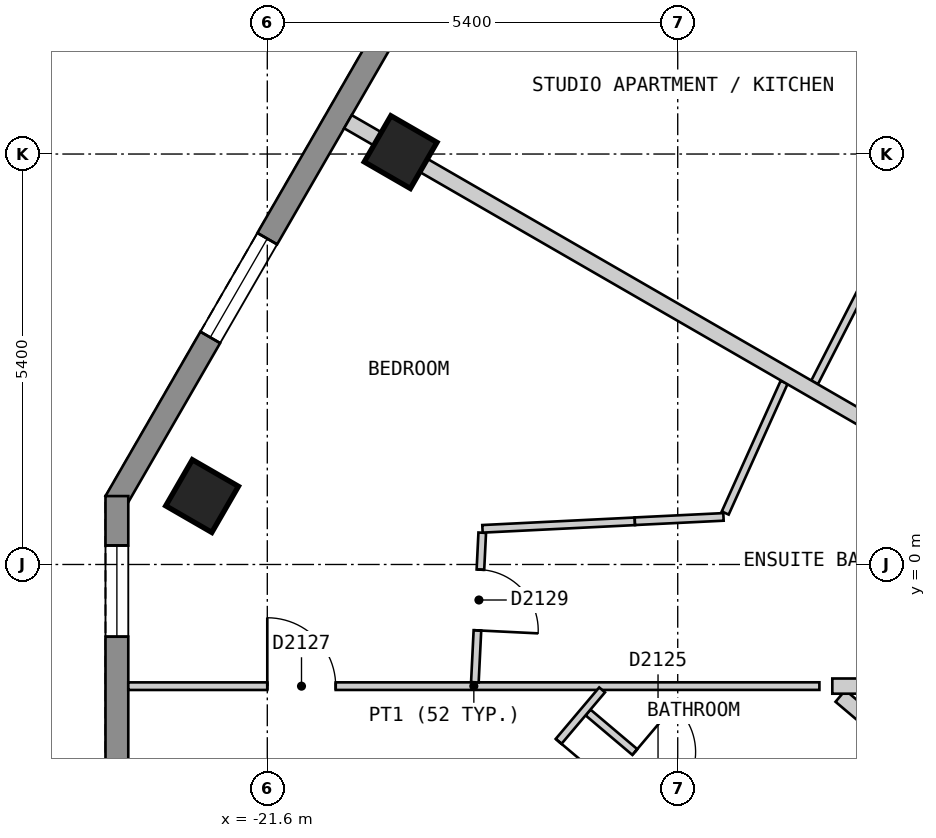
"""IFC4 building model, lengths in metres.
Left out: names, types, materials, properties, quantities, classifications, styles, units other than length and angle.
Written with IfcOpenShell. Run it as: python <this file> out.ifc"""

import sys

from ifc_helpers import new_model, si_unit, direction, frame, frame_2d, origin, origin_2d, place, context, subcontext, project, spatial, polyline, rectangle, outline, extrude, element, fill, save


model = new_model("IFC4")
c1 = context("Model", 3, precision=1e-05, world=origin(), true_north=direction((0.0, 1.0)))
c2 = subcontext(c1, "Body", "Model", "MODEL_VIEW")
j1 = project(units=[si_unit("LENGTHUNIT", "METRE"), si_unit("PLANEANGLEUNIT", "RADIAN")], contexts=[c1])
p1 = place(None, origin())
s1 = spatial("IfcSite", under=j1, at=p1, CompositionType="ELEMENT")
p2 = place(p1, origin())
s2 = spatial("IfcBuilding", under=s1, at=p2, CompositionType="ELEMENT")
p3 = place(p2, frame((0.0, 0.0, 217.8)))
s3 = spatial("IfcBuildingStorey", under=s2, at=p3, CompositionType="ELEMENT", Elevation=217.8)
for number, where, z_axis, x_axis in (
    (1, (-19.846, 5.425, 0.0), (0.0, 0.0, 1.0), (-0.5, -0.866, 0.0)),
    (2, (-22.458, 0.9, 0.0), (0.0, 0.0, 1.0), (-0.5, -0.866, 0.0)),
):
    element("IfcColumn", number, at=place(p3, frame(where, z_axis=z_axis, x_axis=x_axis)), inside=s3, PredefinedType="COLUMN", context=c2, shape_type="SweptSolid", body=[
        extrude(rectangle(XDim=0.7, YDim=0.7, at=origin_2d()), origin(), (0.0, 0.0, 1.0), 3.0),
    ])
p4 = place(p3, frame((-12.514, 20.025, 0.0), z_axis=(0.0, 0.0, 1.0), x_axis=(-0.500003656944, -0.866023292436, 0.0)))
e3 = element("IfcWall", 3, at=p4, inside=s3, PredefinedType="SOLIDWALL", context=c2, shape_type="SweptSolid", body=[
    extrude(outline(polyline([(0.0, -0.15), (22.17, -0.15), (22.09, 0.15), (0.08, 0.15), (0.0, -0.15)])), origin(), (0.0, 0.0, 1.0), 2.7),
])
p5 = place(p4, frame((2.497, 0.0, 0.15)))
e4 = element("IfcOpeningElement", 4, at=p5, cuts=e3, PredefinedType="OPENING", context=c2, shape_type="SweptSolid", body=[
    extrude(rectangle(XDim=1.5, YDim=2.1, at=frame_2d((0.75, 1.05))), frame((0.0, 0.16, 0.0), z_axis=(0.0, -1.0, 0.0), x_axis=(1.0, 0.0, 0.0)), (0.0, 0.0, 1.0), 0.32),
])
p6 = place(p4, frame((7.722, 0.0, 0.15)))
e5 = element("IfcOpeningElement", 5, at=p6, cuts=e3, PredefinedType="OPENING", context=c2, shape_type="SweptSolid", body=[
    extrude(rectangle(XDim=1.5, YDim=2.1, at=frame_2d((0.75, 1.05))), frame((0.0, 0.16, 0.0), z_axis=(0.0, -1.0, 0.0), x_axis=(1.0, 0.0, 0.0)), (0.0, 0.0, 1.0), 0.32),
])
p7 = place(p4, frame((12.948, 0.0, 0.15)))
e6 = element("IfcOpeningElement", 6, at=p7, cuts=e3, PredefinedType="OPENING", context=c2, shape_type="SweptSolid", body=[
    extrude(rectangle(XDim=1.5, YDim=2.1, at=frame_2d((0.75, 1.05))), frame((0.0, 0.16, 0.0), z_axis=(0.0, -1.0, 0.0), x_axis=(1.0, 0.0, 0.0)), (0.0, 0.0, 1.0), 0.32),
])
p8 = place(p4, frame((18.173, 0.0, 0.15)))
e7 = element("IfcOpeningElement", 7, at=p8, cuts=e3, PredefinedType="OPENING", context=c2, shape_type="SweptSolid", body=[
    extrude(rectangle(XDim=1.5, YDim=2.1, at=frame_2d((0.75, 1.05))), frame((0.0, 0.16, 0.0), z_axis=(0.0, -1.0, 0.0), x_axis=(1.0, 0.0, 0.0)), (0.0, 0.0, 1.0), 0.32),
])
p9 = place(p3, frame((-23.579, 0.9, 0.0), z_axis=(0.0, 0.0, 1.0), x_axis=(0.0, -1.0, 0.0)))
e8 = element("IfcWall", 8, at=p9, inside=s3, PredefinedType="SOLIDWALL", context=c2, shape_type="SweptSolid", body=[
    extrude(outline(polyline([(0.0, -0.15), (5.0, -0.15), (4.92, 0.15), (0.08, 0.15), (0.0, -0.15)])), origin(), (0.0, 0.0, 1.0), 2.7),
])
p10 = place(p9, frame((0.65, 0.0, 0.15)))
e9 = element("IfcOpeningElement", 9, at=p10, cuts=e8, PredefinedType="OPENING", context=c2, shape_type="SweptSolid", body=[
    extrude(rectangle(XDim=1.2, YDim=2.1, at=frame_2d((0.6, 1.05))), frame((0.0, 0.16, 0.0), z_axis=(0.0, -1.0, 0.0), x_axis=(1.0, 0.0, 0.0)), (0.0, 0.0, 1.0), 0.32),
])
p11 = place(p3, frame((-17.38, -1.947, 0.0), z_axis=(0.0, 0.0, 1.0), x_axis=(0.763616683524, -0.645669854217, 0.0)))
e10 = element("IfcWall", 10, at=p11, inside=s3, PredefinedType="PARTITIONING", context=c2, shape_type="SweptSolid", body=[
    extrude(rectangle(XDim=2.331, YDim=0.1, at=frame_2d((1.166, 0.0))), origin(), (0.0, 0.0, 1.0), 2.7),
])
p12 = place(p11, frame((0.806, 0.0, 0.0)))
e11 = element("IfcOpeningElement", 11, at=p12, cuts=e10, PredefinedType="OPENING", context=c2, shape_type="SweptSolid", body=[
    extrude(rectangle(XDim=0.8, YDim=2.1, at=frame_2d((0.4, 1.05))), frame((0.0, 0.06, 0.0), z_axis=(0.0, -1.0, 0.0), x_axis=(1.0, 0.0, 0.0)), (0.0, 0.0, 1.0), 0.12),
])
p13 = place(p3, frame((-23.429, -1.601, 0.0), z_axis=(0.0, 0.0, 1.0), x_axis=(0.999999994233, 0.000107396965, 0.0)))
e12 = element("IfcWall", 12, at=p13, inside=s3, PredefinedType="PARTITIONING", context=c2, shape_type="SweptSolid", body=[
    extrude(rectangle(XDim=9.093, YDim=0.1, at=frame_2d((4.546, 0.0))), origin(), (0.0, 0.0, 1.0), 2.7),
])
p14 = place(p13, frame((1.829, 0.0, 0.0)))
e13 = element("IfcOpeningElement", 13, at=p14, cuts=e12, PredefinedType="OPENING", context=c2, shape_type="SweptSolid", body=[
    extrude(rectangle(XDim=0.9, YDim=2.1, at=frame_2d((0.45, 1.05))), frame((0.0, 0.06, 0.0), z_axis=(0.0, -1.0, 0.0), x_axis=(1.0, 0.0, 0.0)), (0.0, 0.0, 1.0), 0.12),
])
p15 = place(p3, frame((-20.188, -5.191, 0.0), z_axis=(0.0, 0.0, 1.0), x_axis=(0.645524337256, 0.763739700429, 0.0)))
e14 = element("IfcWall", 14, at=p15, inside=s3, PredefinedType="PARTITIONING", context=c2, shape_type="SweptSolid", body=[
    extrude(rectangle(XDim=4.636, YDim=0.1, at=frame_2d((2.318, 0.0))), origin(), (0.0, 0.0, 1.0), 2.7),
])
p16 = place(p15, frame((2.85, 0.0, 0.0)))
e15 = element("IfcOpeningElement", 15, at=p16, cuts=e14, PredefinedType="OPENING", context=c2, shape_type="SweptSolid", body=[
    extrude(rectangle(XDim=0.9, YDim=2.1, at=frame_2d((0.45, 1.05))), frame((0.0, 0.06, 0.0), z_axis=(0.0, -1.0, 0.0), x_axis=(1.0, 0.0, 0.0)), (0.0, 0.0, 1.0), 0.12),
])
p17 = place(p3, frame((-15.575, 0.677, 0.0), z_axis=(0.0, 0.0, 1.0), x_axis=(0.410768223147, 0.911739802165, 0.0)))
e16 = element("IfcWall", 16, at=p17, inside=s3, PredefinedType="PARTITIONING", context=c2, shape_type="SweptSolid", body=[
    extrude(rectangle(XDim=1.886, YDim=0.1, at=frame_2d((0.943, 0.0))), origin(), (0.0, 0.0, 1.0), 2.7),
])
p18 = place(p3, frame((-14.399, 2.396, 0.0), z_axis=(0.0, 0.0, 1.0), x_axis=(0.455967231787, 0.889996563778, 0.0)))
e17 = element("IfcWall", 17, at=p18, inside=s3, PredefinedType="PARTITIONING", context=c2, shape_type="SweptSolid", body=[
    extrude(rectangle(XDim=3.149, YDim=0.1, at=frame_2d((1.575, 0.0))), origin(), (0.0, 0.0, 1.0), 2.7),
])
p19 = place(p3, frame((-18.869, -1.55, 0.0), z_axis=(0.0, 0.0, 1.0), x_axis=(0.049189853645, 0.998789446429, 0.0)))
e18 = element("IfcWall", 18, at=p19, inside=s3, PredefinedType="PARTITIONING", context=c2, shape_type="SweptSolid", body=[
    extrude(rectangle(XDim=1.97, YDim=0.1, at=frame_2d((0.985, 0.0))), origin(), (0.0, 0.0, 1.0), 2.7),
])
p20 = place(p19, frame((0.684, 0.0, 0.0)))
e19 = element("IfcOpeningElement", 19, at=p20, cuts=e18, PredefinedType="OPENING", context=c2, shape_type="SweptSolid", body=[
    extrude(rectangle(XDim=0.8, YDim=2.1, at=frame_2d((0.4, 1.05))), frame((0.0, 0.06, 0.0), z_axis=(0.0, -1.0, 0.0), x_axis=(1.0, 0.0, 0.0)), (0.0, 0.0, 1.0), 0.12),
])
p21 = place(p3, frame((-18.769, 0.469, 0.0), z_axis=(0.0, 0.0, 1.0), x_axis=(0.998780383332, 0.049373534108, 0.0)))
e20 = element("IfcWall", 20, at=p21, inside=s3, PredefinedType="PARTITIONING", context=c2, shape_type="SweptSolid", body=[
    extrude(rectangle(XDim=2.008, YDim=0.1, at=frame_2d((1.004, 0.0))), origin(), (0.0, 0.0, 1.0), 2.7),
])
p22 = place(p3, frame((-16.764, 0.569, 0.0), z_axis=(0.0, 0.0, 1.0), x_axis=(0.998812102885, 0.048727642373, 0.0)))
e21 = element("IfcWall", 21, at=p22, inside=s3, PredefinedType="PARTITIONING", context=c2, shape_type="SweptSolid", body=[
    extrude(rectangle(XDim=1.167, YDim=0.1, at=frame_2d((0.584, 0.0))), origin(), (0.0, 0.0, 1.0), 2.7),
])
p23 = place(p3, frame((-20.539, 5.825, 0.0), z_axis=(0.0, 0.0, 1.0), x_axis=(0.866046068403, -0.499964206122, 0.0)))
e22 = element("IfcWall", 22, at=p23, inside=s3, PredefinedType="PARTITIONING", context=c2, shape_type="SweptSolid", body=[
    extrude(rectangle(XDim=9.995, YDim=0.2, at=frame_2d((4.998, 0.0))), origin(), (0.0, 0.0, 1.0), 2.7),
])
p24 = place(p3, frame((-17.926, 10.35, 0.0), z_axis=(0.0, 0.0, 1.0), x_axis=(0.866018411306, -0.500012111133, 0.0)))
e23 = element("IfcWall", 23, at=p24, inside=s3, PredefinedType="PARTITIONING", context=c2, shape_type="SweptSolid", body=[
    extrude(rectangle(XDim=9.898, YDim=0.2, at=frame_2d((4.949, 0.0))), origin(), (0.0, 0.0, 1.0), 2.7),
])
p25 = place(p3, frame((-14.059, -1.73, 0.0), z_axis=(0.0, 0.0, 1.0), x_axis=(0.763289607824, -0.64605647941, 0.0)))
e24 = element("IfcWall", 24, at=p25, inside=s3, PredefinedType="PARTITIONING", context=c2, shape_type="SweptSolid", body=[
    extrude(rectangle(XDim=0.766, YDim=0.2, at=frame_2d((0.383, 0.0))), origin(), (0.0, 0.0, 1.0), 2.7),
])
p26 = place(p3, frame((-14.166, -1.6, 0.0), z_axis=(0.0, 0.0, 1.0), x_axis=(1.0, 0.0, 0.0)))
e25 = element("IfcWall", 25, at=p26, inside=s3, PredefinedType="PARTITIONING", context=c2, shape_type="SweptSolid", body=[
    extrude(rectangle(XDim=0.973, YDim=0.2, at=frame_2d((0.486, 0.0))), origin(), (0.0, 0.0, 1.0), 2.7),
])
p27 = place(p8, origin())
e26 = element("IfcWindow", 26, at=p27, inside=s3, PartitioningType="SINGLE_PANEL", PredefinedType="WINDOW", context=c2, shape_type="SweptSolid", body=[
    extrude(rectangle(XDim=1.5, YDim=2.1, at=frame_2d((0.75, 1.05))), frame((0.0, 0.03, 0.0), z_axis=(0.0, -1.0, 0.0), x_axis=(1.0, 0.0, 0.0)), (0.0, 0.0, 1.0), 0.06),
])
fill(e7, e26)
p28 = place(p10, origin())
e27 = element("IfcWindow", 27, at=p28, inside=s3, PartitioningType="SINGLE_PANEL", PredefinedType="WINDOW", context=c2, shape_type="SweptSolid", body=[
    extrude(rectangle(XDim=1.2, YDim=2.1, at=frame_2d((0.6, 1.05))), frame((0.0, 0.03, 0.0), z_axis=(0.0, -1.0, 0.0), x_axis=(1.0, 0.0, 0.0)), (0.0, 0.0, 1.0), 0.06),
])
fill(e9, e27)
p29 = place(p12, origin())
e28 = element("IfcDoor", 28, at=p29, inside=s3, OperationType="SINGLE_SWING_LEFT", PredefinedType="DOOR", context=c2, shape_type="SweptSolid", body=[
    extrude(rectangle(XDim=0.8, YDim=2.1, at=frame_2d((0.4, 1.05))), frame((0.0, 0.025, 0.0), z_axis=(0.0, -1.0, 0.0), x_axis=(1.0, 0.0, 0.0)), (0.0, 0.0, 1.0), 0.05),
])
fill(e11, e28)
p30 = place(p16, origin())
e29 = element("IfcDoor", 29, at=p30, inside=s3, OperationType="SINGLE_SWING_RIGHT", PredefinedType="DOOR", context=c2, shape_type="SweptSolid", body=[
    extrude(rectangle(XDim=0.9, YDim=2.1, at=frame_2d((0.45, 1.05))), frame((0.0, 0.025, 0.0), z_axis=(0.0, -1.0, 0.0), x_axis=(1.0, 0.0, 0.0)), (0.0, 0.0, 1.0), 0.05),
])
fill(e15, e29)
p31 = place(p14, origin())
e30 = element("IfcDoor", 30, at=p31, inside=s3, OperationType="SINGLE_SWING_LEFT", PredefinedType="DOOR", context=c2, shape_type="SweptSolid", body=[
    extrude(rectangle(XDim=0.9, YDim=2.1, at=frame_2d((0.45, 1.05))), frame((0.0, 0.025, 0.0), z_axis=(0.0, -1.0, 0.0), x_axis=(1.0, 0.0, 0.0)), (0.0, 0.0, 1.0), 0.05),
])
fill(e13, e30)
p32 = place(p20, origin())
e31 = element("IfcDoor", 31, at=p32, inside=s3, OperationType="SINGLE_SWING_LEFT", PredefinedType="DOOR", context=c2, shape_type="SweptSolid", body=[
    extrude(rectangle(XDim=0.8, YDim=2.1, at=frame_2d((0.4, 1.05))), frame((0.0, 0.025, 0.0), z_axis=(0.0, -1.0, 0.0), x_axis=(1.0, 0.0, 0.0)), (0.0, 0.0, 1.0), 0.05),
])
fill(e19, e31)
save(model, sys.argv[1])
